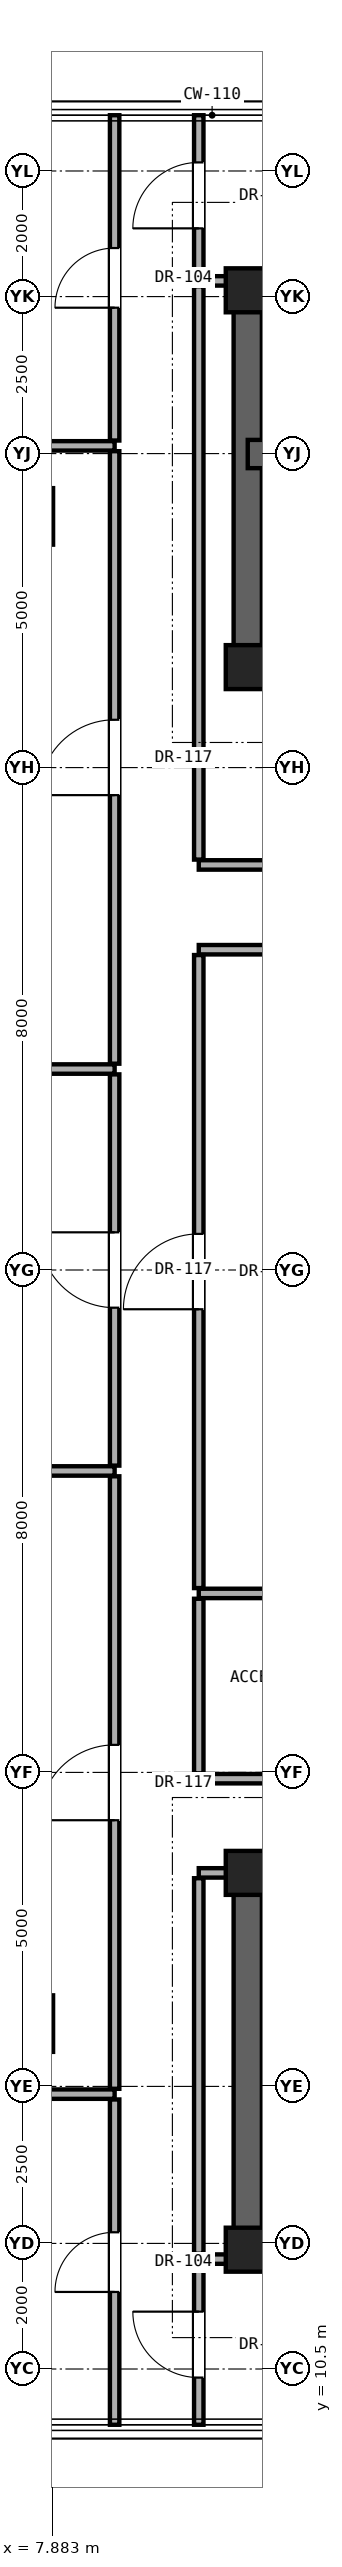
"""IFC4 building model, lengths in metres.
Left out: names, types, materials, properties, quantities, classifications, styles, units other than length and angle.
Written with IfcOpenShell. Run it as: python <this file> out.ifc"""

import sys

from ifc_helpers import new_model, si_unit, direction, frame, frame_2d, origin, origin_2d, place, context, subcontext, project, spatial, rectangle, extrude, element, fill, save


model = new_model("IFC4")
c1 = context("Model", 3, precision=1e-05, world=origin(), true_north=direction((0.0, 1.0)))
c2 = subcontext(c1, "Body", "Model", "MODEL_VIEW")
j1 = project(units=[si_unit("LENGTHUNIT", "METRE"), si_unit("PLANEANGLEUNIT", "RADIAN")], contexts=[c1])
p1 = place(None, origin())
s1 = spatial("IfcSite", under=j1, at=p1, CompositionType="ELEMENT")
p2 = place(p1, origin())
s2 = spatial("IfcBuilding", under=s1, at=p2, CompositionType="ELEMENT")
p3 = place(p2, frame((0.0, 0.0, 252.7)))
s3 = spatial("IfcBuildingStorey", under=s2, at=p3, CompositionType="ELEMENT", Elevation=252.7)
for number, where, z_axis, x_axis in (
    (1, (11.0, 12.4, 0.0), (0.0, 0.0, 1.0), (1.0, 0.0, 0.0)),
    (2, (11.0, 18.4, 0.0), (0.0, 0.0, 1.0), (1.0, 0.0, 0.0)),
    (3, (11.0, 37.6, 0.0), (0.0, 0.0, 1.0), (1.0, 0.0, 0.0)),
    (4, (11.0, 43.6, 0.0), (0.0, 0.0, 1.0), (1.0, 0.0, 0.0)),
):
    element("IfcColumn", number, at=place(p3, frame(where, z_axis=z_axis, x_axis=x_axis)), inside=s3, PredefinedType="COLUMN", context=c2, shape_type="SweptSolid", body=[
        extrude(rectangle(XDim=0.7, YDim=0.7, at=origin_2d()), origin(), (0.0, 0.0, 1.0), 3.6),
    ])
for number, where, z_axis, x_axis in (
    (5, (7.6, 16.0, 0.0), (0.0, 0.0, 1.0), (1.0, 0.0, 0.0)),
    (6, (7.6, 40.0, 0.0), (0.0, 0.0, 1.0), (1.0, 0.0, 0.0)),
):
    element("IfcColumn", number, at=place(p3, frame(where, z_axis=z_axis, x_axis=x_axis)), inside=s3, PredefinedType="PILASTER", context=c2, shape_type="SweptSolid", body=[
        extrude(rectangle(XDim=0.6, YDim=0.9, at=origin_2d()), origin(), (0.0, 0.0, 1.0), 3.6),
    ])
p4 = place(p3, frame((11.0, 43.6, 0.0), z_axis=(0.0, 0.0, 1.0), x_axis=(1.0, 0.0, 0.0)))
e7 = element("IfcWall", 7, at=p4, inside=s3, PredefinedType="SHEAR", context=c2, shape_type="SweptSolid", body=[
    extrude(rectangle(XDim=19.0, YDim=0.45, at=frame_2d((9.5, 0.0))), origin(), (0.0, 0.0, 1.0), 3.4),
])
p5 = place(p3, frame((11.0, 37.6, 0.0), z_axis=(0.0, 0.0, 1.0), x_axis=(0.0, 1.0, 0.0)))
e8 = element("IfcWall", 8, at=p5, inside=s3, PredefinedType="SHEAR", context=c2, shape_type="SweptSolid", body=[
    extrude(rectangle(XDim=6.0, YDim=0.45, at=frame_2d((3.0, 0.0))), origin(), (0.0, 0.0, 1.0), 3.4),
])
p6 = place(p3, frame((11.0, 37.6, 0.0), z_axis=(0.0, 0.0, 1.0), x_axis=(1.0, 0.0, 0.0)))
e9 = element("IfcWall", 9, at=p6, inside=s3, PredefinedType="SHEAR", context=c2, shape_type="SweptSolid", body=[
    extrude(rectangle(XDim=19.0, YDim=0.45, at=frame_2d((9.5, 0.0))), origin(), (0.0, 0.0, 1.0), 3.4),
])
p7 = place(p6, frame((1.06, 0.0, 0.0)))
e10 = element("IfcOpeningElement", 10, at=p7, cuts=e9, PredefinedType="OPENING", context=c2, shape_type="SweptSolid", body=[
    extrude(rectangle(XDim=1.15, YDim=2.2, at=frame_2d((0.575, 1.1))), frame((0.0, 0.235, 0.0), z_axis=(0.0, -1.0, 0.0), x_axis=(1.0, 0.0, 0.0)), (0.0, 0.0, 1.0), 0.47),
])
p8 = place(p6, frame((9.55, 0.0, 0.0)))
e11 = element("IfcOpeningElement", 11, at=p8, cuts=e9, PredefinedType="OPENING", context=c2, shape_type="SweptSolid", body=[
    extrude(rectangle(XDim=1.4, YDim=2.35, at=frame_2d((0.7, 1.175))), frame((0.0, 0.235, 0.0), z_axis=(0.0, -1.0, 0.0), x_axis=(1.0, 0.0, 0.0)), (0.0, 0.0, 1.0), 0.47),
])
p9 = place(p6, frame((11.95, 0.0, 0.0)))
e12 = element("IfcOpeningElement", 12, at=p9, cuts=e9, PredefinedType="OPENING", context=c2, shape_type="SweptSolid", body=[
    extrude(rectangle(XDim=1.4, YDim=2.35, at=frame_2d((0.7, 1.175))), frame((0.0, 0.235, 0.0), z_axis=(0.0, -1.0, 0.0), x_axis=(1.0, 0.0, 0.0)), (0.0, 0.0, 1.0), 0.47),
])
p10 = place(p3, frame((11.0, 40.993, 0.0), z_axis=(0.0, 0.0, 1.0), x_axis=(1.0, 0.0, 0.0)))
e13 = element("IfcWall", 13, at=p10, inside=s3, PredefinedType="SHEAR", context=c2, shape_type="SweptSolid", body=[
    extrude(rectangle(XDim=9.0, YDim=0.45, at=frame_2d((4.5, 0.0))), origin(), (0.0, 0.0, 1.0), 3.4),
])
p11 = place(p3, frame((11.0, 12.4, 0.0), z_axis=(0.0, 0.0, 1.0), x_axis=(1.0, 0.0, 0.0)))
e14 = element("IfcWall", 14, at=p11, inside=s3, PredefinedType="SHEAR", context=c2, shape_type="SweptSolid", body=[
    extrude(rectangle(XDim=19.0, YDim=0.45, at=frame_2d((9.5, 0.0))), origin(), (0.0, 0.0, 1.0), 3.4),
])
p12 = place(p3, frame((11.0, 12.4, 0.0), z_axis=(0.0, 0.0, 1.0), x_axis=(0.0, 1.0, 0.0)))
e15 = element("IfcWall", 15, at=p12, inside=s3, PredefinedType="SHEAR", context=c2, shape_type="SweptSolid", body=[
    extrude(rectangle(XDim=6.0, YDim=0.45, at=frame_2d((3.0, 0.0))), origin(), (0.0, 0.0, 1.0), 3.4),
])
p13 = place(p3, frame((11.0, 18.4, 0.0), z_axis=(0.0, 0.0, 1.0), x_axis=(1.0, 0.0, 0.0)))
e16 = element("IfcWall", 16, at=p13, inside=s3, PredefinedType="SHEAR", context=c2, shape_type="SweptSolid", body=[
    extrude(rectangle(XDim=19.0, YDim=0.45, at=frame_2d((9.5, 0.0))), origin(), (0.0, 0.0, 1.0), 3.4),
])
p14 = place(p13, frame((4.175, 0.0, 0.0)))
e17 = element("IfcOpeningElement", 17, at=p14, cuts=e16, PredefinedType="OPENING", context=c2, shape_type="SweptSolid", body=[
    extrude(rectangle(XDim=1.2, YDim=2.25, at=frame_2d((0.6, 1.125))), frame((0.0, 0.235, 0.0), z_axis=(0.0, -1.0, 0.0), x_axis=(1.0, 0.0, 0.0)), (0.0, 0.0, 1.0), 0.47),
])
p15 = place(p13, frame((11.075, 0.0, 0.0)))
e18 = element("IfcOpeningElement", 18, at=p15, cuts=e16, PredefinedType="OPENING", context=c2, shape_type="SweptSolid", body=[
    extrude(rectangle(XDim=0.95, YDim=2.15, at=frame_2d((0.475, 1.075))), frame((0.0, 0.235, 0.0), z_axis=(0.0, -1.0, 0.0), x_axis=(1.0, 0.0, 0.0)), (0.0, 0.0, 1.0), 0.47),
])
p16 = place(p13, frame((14.3, 0.0, 0.0)))
e19 = element("IfcOpeningElement", 19, at=p16, cuts=e16, PredefinedType="OPENING", context=c2, shape_type="SweptSolid", body=[
    extrude(rectangle(XDim=1.3, YDim=2.3, at=frame_2d((0.65, 1.15))), frame((0.0, 0.235, 0.0), z_axis=(0.0, -1.0, 0.0), x_axis=(1.0, 0.0, 0.0)), (0.0, 0.0, 1.0), 0.47),
])
p17 = place(p13, frame((16.6, 0.0, 0.0)))
e20 = element("IfcOpeningElement", 20, at=p17, cuts=e16, PredefinedType="OPENING", context=c2, shape_type="SweptSolid", body=[
    extrude(rectangle(XDim=1.3, YDim=2.3, at=frame_2d((0.65, 1.15))), frame((0.0, 0.235, 0.0), z_axis=(0.0, -1.0, 0.0), x_axis=(1.0, 0.0, 0.0)), (0.0, 0.0, 1.0), 0.47),
])
p18 = place(p3, frame((10.22, 12.25, 0.0), z_axis=(0.0, 0.0, 1.0), x_axis=(1.0, 0.0, 0.0)))
e21 = element("IfcWall", 21, at=p18, inside=s3, PredefinedType="PARTITIONING", context=c2, shape_type="SweptSolid", body=[
    extrude(rectangle(XDim=0.56, YDim=0.15, at=frame_2d((0.28, 0.0))), origin(), (0.0, 0.0, 1.0), 3.4),
])
p19 = place(p3, frame((5.675, 14.877, 0.0), z_axis=(0.0, 0.0, 1.0), x_axis=(1.0, 0.0, 0.0)))
e22 = element("IfcWall", 22, at=p19, inside=s3, PredefinedType="PARTITIONING", context=c2, shape_type="SweptSolid", body=[
    extrude(rectangle(XDim=3.205, YDim=0.15, at=frame_2d((1.603, 0.0))), origin(), (0.0, 0.0, 1.0), 3.4),
])
p20 = place(p3, frame((10.22, 18.4, 0.0), z_axis=(0.0, 0.0, 1.0), x_axis=(1.0, 0.0, 0.0)))
e23 = element("IfcWall", 23, at=p20, inside=s3, PredefinedType="PARTITIONING", context=c2, shape_type="SweptSolid", body=[
    extrude(rectangle(XDim=0.56, YDim=0.15, at=frame_2d((0.28, 0.0))), origin(), (0.0, 0.0, 1.0), 2.792),
])
p21 = place(p3, frame((10.22, 19.9, 0.0), z_axis=(0.0, 0.0, 1.0), x_axis=(1.0, 0.0, 0.0)))
e24 = element("IfcWall", 24, at=p21, inside=s3, PredefinedType="PARTITIONING", context=c2, shape_type="SweptSolid", body=[
    extrude(rectangle(XDim=20.56, YDim=0.15, at=frame_2d((10.28, 0.0))), origin(), (0.0, 0.0, 1.0), 2.536),
])
p22 = place(p21, frame((1.36, 0.0, 0.0)))
e25 = element("IfcOpeningElement", 25, at=p22, cuts=e24, PredefinedType="OPENING", context=c2, shape_type="SweptSolid", body=[
    extrude(rectangle(XDim=0.9, YDim=2.1, at=frame_2d((0.45, 1.05))), frame((0.0, 0.085, 0.0), z_axis=(0.0, -1.0, 0.0), x_axis=(1.0, 0.0, 0.0)), (0.0, 0.0, 1.0), 0.17),
])
p23 = place(p21, frame((9.68, 0.0, 0.0)))
e26 = element("IfcOpeningElement", 26, at=p23, cuts=e24, PredefinedType="OPENING", context=c2, shape_type="SweptSolid", body=[
    extrude(rectangle(XDim=1.2, YDim=2.25, at=frame_2d((0.6, 1.125))), frame((0.0, 0.085, 0.0), z_axis=(0.0, -1.0, 0.0), x_axis=(1.0, 0.0, 0.0)), (0.0, 0.0, 1.0), 0.17),
])
p24 = place(p3, frame((10.22, 22.85, 0.0), z_axis=(0.0, 0.0, 1.0), x_axis=(1.0, 0.0, 0.0)))
e27 = element("IfcWall", 27, at=p24, inside=s3, PredefinedType="PARTITIONING", context=c2, shape_type="SweptSolid", body=[
    extrude(rectangle(XDim=6.13, YDim=0.15, at=frame_2d((3.065, 0.0))), origin(), (0.0, 0.0, 1.0), 2.536),
])
for number, where, z_axis, x_axis in (
    (28, (0.39, 24.8, 0.0), (0.0, 0.0, 1.0), (1.0, 0.0, 0.0)),
    (29, (0.39, 31.2, 0.0), (0.0, 0.0, 1.0), (1.0, 0.0, 0.0)),
):
    element("IfcWall", number, at=place(p3, frame(where, z_axis=z_axis, x_axis=x_axis)), inside=s3, PredefinedType="PARTITIONING", context=c2, shape_type="SweptSolid", body=[
        extrude(rectangle(XDim=8.49, YDim=0.15, at=frame_2d((4.245, 0.0))), origin(), (0.0, 0.0, 1.0), 2.619),
    ])
p25 = place(p3, frame((10.22, 33.1, 0.0), z_axis=(0.0, 0.0, 1.0), x_axis=(1.0, 0.0, 0.0)))
e30 = element("IfcWall", 30, at=p25, inside=s3, PredefinedType="PARTITIONING", context=c2, shape_type="SweptSolid", body=[
    extrude(rectangle(XDim=20.56, YDim=0.15, at=frame_2d((10.28, 0.0))), origin(), (0.0, 0.0, 1.0), 2.536),
])
p26 = place(p3, frame((10.22, 34.45, 0.0), z_axis=(0.0, 0.0, 1.0), x_axis=(1.0, 0.0, 0.0)))
e31 = element("IfcWall", 31, at=p26, inside=s3, PredefinedType="PARTITIONING", context=c2, shape_type="SweptSolid", body=[
    extrude(rectangle(XDim=1.58, YDim=0.15, at=frame_2d((0.79, 0.0))), origin(), (0.0, 0.0, 1.0), 2.536),
])
p27 = place(p3, frame((5.675, 41.123, 0.0), z_axis=(0.0, 0.0, 1.0), x_axis=(1.0, 0.0, 0.0)))
e32 = element("IfcWall", 32, at=p27, inside=s3, PredefinedType="PARTITIONING", context=c2, shape_type="SweptSolid", body=[
    extrude(rectangle(XDim=3.205, YDim=0.15, at=frame_2d((1.603, 0.0))), origin(), (0.0, 0.0, 1.0), 3.4),
])
p28 = place(p3, frame((10.22, 43.75, 0.0), z_axis=(0.0, 0.0, 1.0), x_axis=(1.0, 0.0, 0.0)))
e33 = element("IfcWall", 33, at=p28, inside=s3, PredefinedType="PARTITIONING", context=c2, shape_type="SweptSolid", body=[
    extrude(rectangle(XDim=0.56, YDim=0.15, at=frame_2d((0.28, 0.0))), origin(), (0.0, 0.0, 1.0), 3.4),
])
p29 = place(p3, frame((8.88, 9.612, 0.0), z_axis=(0.0, 0.0, 1.0), x_axis=(0.0, 1.0, 0.0)))
e34 = element("IfcWall", 34, at=p29, inside=s3, PredefinedType="PARTITIONING", context=c2, shape_type="SweptSolid", body=[
    extrude(rectangle(XDim=5.18, YDim=0.15, at=frame_2d((2.59, 0.0))), origin(), (0.0, 0.0, 1.0), 3.4),
])
p30 = place(p29, frame((2.115, 0.0, 0.0)))
e35 = element("IfcOpeningElement", 35, at=p30, cuts=e34, PredefinedType="OPENING", context=c2, shape_type="SweptSolid", body=[
    extrude(rectangle(XDim=0.95, YDim=2.15, at=frame_2d((0.475, 1.075))), frame((0.0, 0.085, 0.0), z_axis=(0.0, -1.0, 0.0), x_axis=(1.0, 0.0, 0.0)), (0.0, 0.0, 1.0), 0.17),
])
p31 = place(p3, frame((8.88, 14.962, 0.0), z_axis=(0.0, 0.0, 1.0), x_axis=(0.0, 1.0, 0.0)))
e36 = element("IfcWall", 36, at=p31, inside=s3, PredefinedType="PARTITIONING", context=c2, shape_type="SweptSolid", body=[
    extrude(rectangle(XDim=9.753, YDim=0.15, at=frame_2d((4.876, 0.0))), origin(), (0.0, 0.0, 1.0), 2.696),
])
p32 = place(p31, frame((4.277, 0.0, 0.0)))
e37 = element("IfcOpeningElement", 37, at=p32, cuts=e36, PredefinedType="OPENING", context=c2, shape_type="SweptSolid", body=[
    extrude(rectangle(XDim=1.2, YDim=2.25, at=frame_2d((0.6, 1.125))), frame((0.0, 0.085, 0.0), z_axis=(0.0, -1.0, 0.0), x_axis=(1.0, 0.0, 0.0)), (0.0, 0.0, 1.0), 0.17),
])
p33 = place(p3, frame((8.88, 24.885, 0.0), z_axis=(0.0, 0.0, 1.0), x_axis=(0.0, 1.0, 0.0)))
e38 = element("IfcWall", 38, at=p33, inside=s3, PredefinedType="PARTITIONING", context=c2, shape_type="SweptSolid", body=[
    extrude(rectangle(XDim=6.23, YDim=0.15, at=frame_2d((3.115, 0.0))), origin(), (0.0, 0.0, 1.0), 2.696),
])
p34 = place(p33, frame((2.515, 0.0, 0.0)))
e39 = element("IfcOpeningElement", 39, at=p34, cuts=e38, PredefinedType="OPENING", context=c2, shape_type="SweptSolid", body=[
    extrude(rectangle(XDim=1.2, YDim=2.25, at=frame_2d((0.6, 1.125))), frame((0.0, 0.085, 0.0), z_axis=(0.0, -1.0, 0.0), x_axis=(1.0, 0.0, 0.0)), (0.0, 0.0, 1.0), 0.17),
])
p35 = place(p3, frame((8.88, 31.285, 0.0), z_axis=(0.0, 0.0, 1.0), x_axis=(0.0, 1.0, 0.0)))
e40 = element("IfcWall", 40, at=p35, inside=s3, PredefinedType="PARTITIONING", context=c2, shape_type="SweptSolid", body=[
    extrude(rectangle(XDim=9.753, YDim=0.15, at=frame_2d((4.876, 0.0))), origin(), (0.0, 0.0, 1.0), 2.696),
])
p36 = place(p35, frame((4.277, 0.0, 0.0)))
e41 = element("IfcOpeningElement", 41, at=p36, cuts=e40, PredefinedType="OPENING", context=c2, shape_type="SweptSolid", body=[
    extrude(rectangle(XDim=1.2, YDim=2.25, at=frame_2d((0.6, 1.125))), frame((0.0, 0.085, 0.0), z_axis=(0.0, -1.0, 0.0), x_axis=(1.0, 0.0, 0.0)), (0.0, 0.0, 1.0), 0.17),
])
p37 = place(p3, frame((8.88, 41.208, 0.0), z_axis=(0.0, 0.0, 1.0), x_axis=(0.0, 1.0, 0.0)))
e42 = element("IfcWall", 42, at=p37, inside=s3, PredefinedType="PARTITIONING", context=c2, shape_type="SweptSolid", body=[
    extrude(rectangle(XDim=5.18, YDim=0.15, at=frame_2d((2.59, 0.0))), origin(), (0.0, 0.0, 1.0), 3.4),
])
p38 = place(p37, frame((2.115, 0.0, 0.0)))
e43 = element("IfcOpeningElement", 43, at=p38, cuts=e42, PredefinedType="OPENING", context=c2, shape_type="SweptSolid", body=[
    extrude(rectangle(XDim=0.95, YDim=2.15, at=frame_2d((0.475, 1.075))), frame((0.0, 0.085, 0.0), z_axis=(0.0, -1.0, 0.0), x_axis=(1.0, 0.0, 0.0)), (0.0, 0.0, 1.0), 0.17),
])
p39 = place(p3, frame((10.22, 9.612, 0.0), z_axis=(0.0, 0.0, 1.0), x_axis=(0.0, 1.0, 0.0)))
e44 = element("IfcWall", 44, at=p39, inside=s3, PredefinedType="PARTITIONING", context=c2, shape_type="SweptSolid", body=[
    extrude(rectangle(XDim=2.553, YDim=0.15, at=frame_2d((1.276, 0.0))), origin(), (0.0, 0.0, 1.0), 3.4),
])
p40 = place(p39, frame((0.751, 0.0, 0.0)))
e45 = element("IfcOpeningElement", 45, at=p40, cuts=e44, PredefinedType="OPENING", context=c2, shape_type="SweptSolid", body=[
    extrude(rectangle(XDim=1.05, YDim=2.2, at=frame_2d((0.525, 1.1))), frame((0.0, 0.085, 0.0), z_axis=(0.0, -1.0, 0.0), x_axis=(1.0, 0.0, 0.0)), (0.0, 0.0, 1.0), 0.17),
])
p41 = place(p3, frame((10.22, 12.335, 0.0), z_axis=(0.0, 0.0, 1.0), x_axis=(0.0, 1.0, 0.0)))
e46 = element("IfcWall", 46, at=p41, inside=s3, PredefinedType="PARTITIONING", context=c2, shape_type="SweptSolid", body=[
    extrude(rectangle(XDim=5.98, YDim=0.15, at=frame_2d((2.99, 0.0))), origin(), (0.0, 0.0, 1.0), 2.792),
])
p42 = place(p3, frame((10.22, 19.985, 0.0), z_axis=(0.0, 0.0, 1.0), x_axis=(0.0, 1.0, 0.0)))
e47 = element("IfcWall", 47, at=p42, inside=s3, PredefinedType="PARTITIONING", context=c2, shape_type="SweptSolid", body=[
    extrude(rectangle(XDim=2.78, YDim=0.15, at=frame_2d((1.39, 0.0))), origin(), (0.0, 0.0, 1.0), 3.4),
])
p43 = place(p3, frame((10.22, 22.935, 0.0), z_axis=(0.0, 0.0, 1.0), x_axis=(0.0, 1.0, 0.0)))
e48 = element("IfcWall", 48, at=p43, inside=s3, PredefinedType="PARTITIONING", context=c2, shape_type="SweptSolid", body=[
    extrude(rectangle(XDim=10.08, YDim=0.15, at=frame_2d((5.04, 0.0))), origin(), (0.0, 0.0, 1.0), 2.696),
])
p44 = place(p43, frame((4.44, 0.0, 0.0)))
e49 = element("IfcOpeningElement", 49, at=p44, cuts=e48, PredefinedType="OPENING", context=c2, shape_type="SweptSolid", body=[
    extrude(rectangle(XDim=1.2, YDim=2.25, at=frame_2d((0.6, 1.125))), frame((0.0, 0.085, 0.0), z_axis=(0.0, -1.0, 0.0), x_axis=(1.0, 0.0, 0.0)), (0.0, 0.0, 1.0), 0.17),
])
p45 = place(p3, frame((10.22, 34.535, 0.0), z_axis=(0.0, 0.0, 1.0), x_axis=(0.0, 1.0, 0.0)))
e50 = element("IfcWall", 50, at=p45, inside=s3, PredefinedType="PARTITIONING", context=c2, shape_type="SweptSolid", body=[
    extrude(rectangle(XDim=9.13, YDim=0.15, at=frame_2d((4.565, 0.0))), origin(), (0.0, 0.0, 1.0), 2.792),
])
p46 = place(p3, frame((10.22, 43.835, 0.0), z_axis=(0.0, 0.0, 1.0), x_axis=(0.0, 1.0, 0.0)))
e51 = element("IfcWall", 51, at=p46, inside=s3, PredefinedType="PARTITIONING", context=c2, shape_type="SweptSolid", body=[
    extrude(rectangle(XDim=2.553, YDim=0.15, at=frame_2d((1.276, 0.0))), origin(), (0.0, 0.0, 1.0), 3.4),
])
p47 = place(p46, frame((0.751, 0.0, 0.0)))
e52 = element("IfcOpeningElement", 52, at=p47, cuts=e51, PredefinedType="OPENING", context=c2, shape_type="SweptSolid", body=[
    extrude(rectangle(XDim=1.05, YDim=2.2, at=frame_2d((0.525, 1.1))), frame((0.0, 0.085, 0.0), z_axis=(0.0, -1.0, 0.0), x_axis=(1.0, 0.0, 0.0)), (0.0, 0.0, 1.0), 0.17),
])
p48 = place(p32, origin())
e53 = element("IfcDoor", 53, at=p48, inside=s3, OperationType="SINGLE_SWING_LEFT", PredefinedType="DOOR", context=c2, shape_type="SweptSolid", body=[
    extrude(rectangle(XDim=1.2, YDim=2.25, at=frame_2d((0.6, 1.125))), frame((0.0, 0.025, 0.0), z_axis=(0.0, -1.0, 0.0), x_axis=(1.0, 0.0, 0.0)), (0.0, 0.0, 1.0), 0.05),
])
fill(e37, e53)
p49 = place(p34, origin())
e54 = element("IfcDoor", 54, at=p49, inside=s3, OperationType="SINGLE_SWING_RIGHT", PredefinedType="DOOR", context=c2, shape_type="SweptSolid", body=[
    extrude(rectangle(XDim=1.2, YDim=2.25, at=frame_2d((0.6, 1.125))), frame((0.0, 0.025, 0.0), z_axis=(0.0, -1.0, 0.0), x_axis=(1.0, 0.0, 0.0)), (0.0, 0.0, 1.0), 0.05),
])
fill(e39, e54)
p50 = place(p36, origin())
e55 = element("IfcDoor", 55, at=p50, inside=s3, OperationType="SINGLE_SWING_LEFT", PredefinedType="DOOR", context=c2, shape_type="SweptSolid", body=[
    extrude(rectangle(XDim=1.2, YDim=2.25, at=frame_2d((0.6, 1.125))), frame((0.0, 0.025, 0.0), z_axis=(0.0, -1.0, 0.0), x_axis=(1.0, 0.0, 0.0)), (0.0, 0.0, 1.0), 0.05),
])
fill(e41, e55)
p51 = place(p44, origin())
e56 = element("IfcDoor", 56, at=p51, inside=s3, OperationType="SINGLE_SWING_LEFT", PredefinedType="DOOR", context=c2, shape_type="SweptSolid", body=[
    extrude(rectangle(XDim=1.2, YDim=2.25, at=frame_2d((0.6, 1.125))), frame((0.0, 0.025, 0.0), z_axis=(0.0, -1.0, 0.0), x_axis=(1.0, 0.0, 0.0)), (0.0, 0.0, 1.0), 0.05),
])
fill(e49, e56)
p52 = place(p40, origin())
e57 = element("IfcDoor", 57, at=p52, inside=s3, OperationType="SINGLE_SWING_RIGHT", PredefinedType="DOOR", context=c2, shape_type="SweptSolid", body=[
    extrude(rectangle(XDim=1.05, YDim=2.2, at=frame_2d((0.525, 1.1))), frame((0.0, 0.025, 0.0), z_axis=(0.0, -1.0, 0.0), x_axis=(1.0, 0.0, 0.0)), (0.0, 0.0, 1.0), 0.05),
])
fill(e45, e57)
p53 = place(p30, origin())
e58 = element("IfcDoor", 58, at=p53, inside=s3, OperationType="SINGLE_SWING_LEFT", PredefinedType="DOOR", context=c2, shape_type="SweptSolid", body=[
    extrude(rectangle(XDim=0.95, YDim=2.15, at=frame_2d((0.475, 1.075))), frame((0.0, 0.025, 0.0), z_axis=(0.0, -1.0, 0.0), x_axis=(1.0, 0.0, 0.0)), (0.0, 0.0, 1.0), 0.05),
])
fill(e35, e58)
p54 = place(p47, origin())
e59 = element("IfcDoor", 59, at=p54, inside=s3, OperationType="SINGLE_SWING_LEFT", PredefinedType="DOOR", context=c2, shape_type="SweptSolid", body=[
    extrude(rectangle(XDim=1.05, YDim=2.2, at=frame_2d((0.525, 1.1))), frame((0.0, 0.025, 0.0), z_axis=(0.0, -1.0, 0.0), x_axis=(1.0, 0.0, 0.0)), (0.0, 0.0, 1.0), 0.05),
])
fill(e52, e59)
p55 = place(p38, origin())
e60 = element("IfcDoor", 60, at=p55, inside=s3, OperationType="SINGLE_SWING_LEFT", PredefinedType="DOOR", context=c2, shape_type="SweptSolid", body=[
    extrude(rectangle(XDim=0.95, YDim=2.15, at=frame_2d((0.475, 1.075))), frame((0.0, 0.025, 0.0), z_axis=(0.0, -1.0, 0.0), x_axis=(1.0, 0.0, 0.0)), (0.0, 0.0, 1.0), 0.05),
])
fill(e43, e60)
save(model, sys.argv[1])
